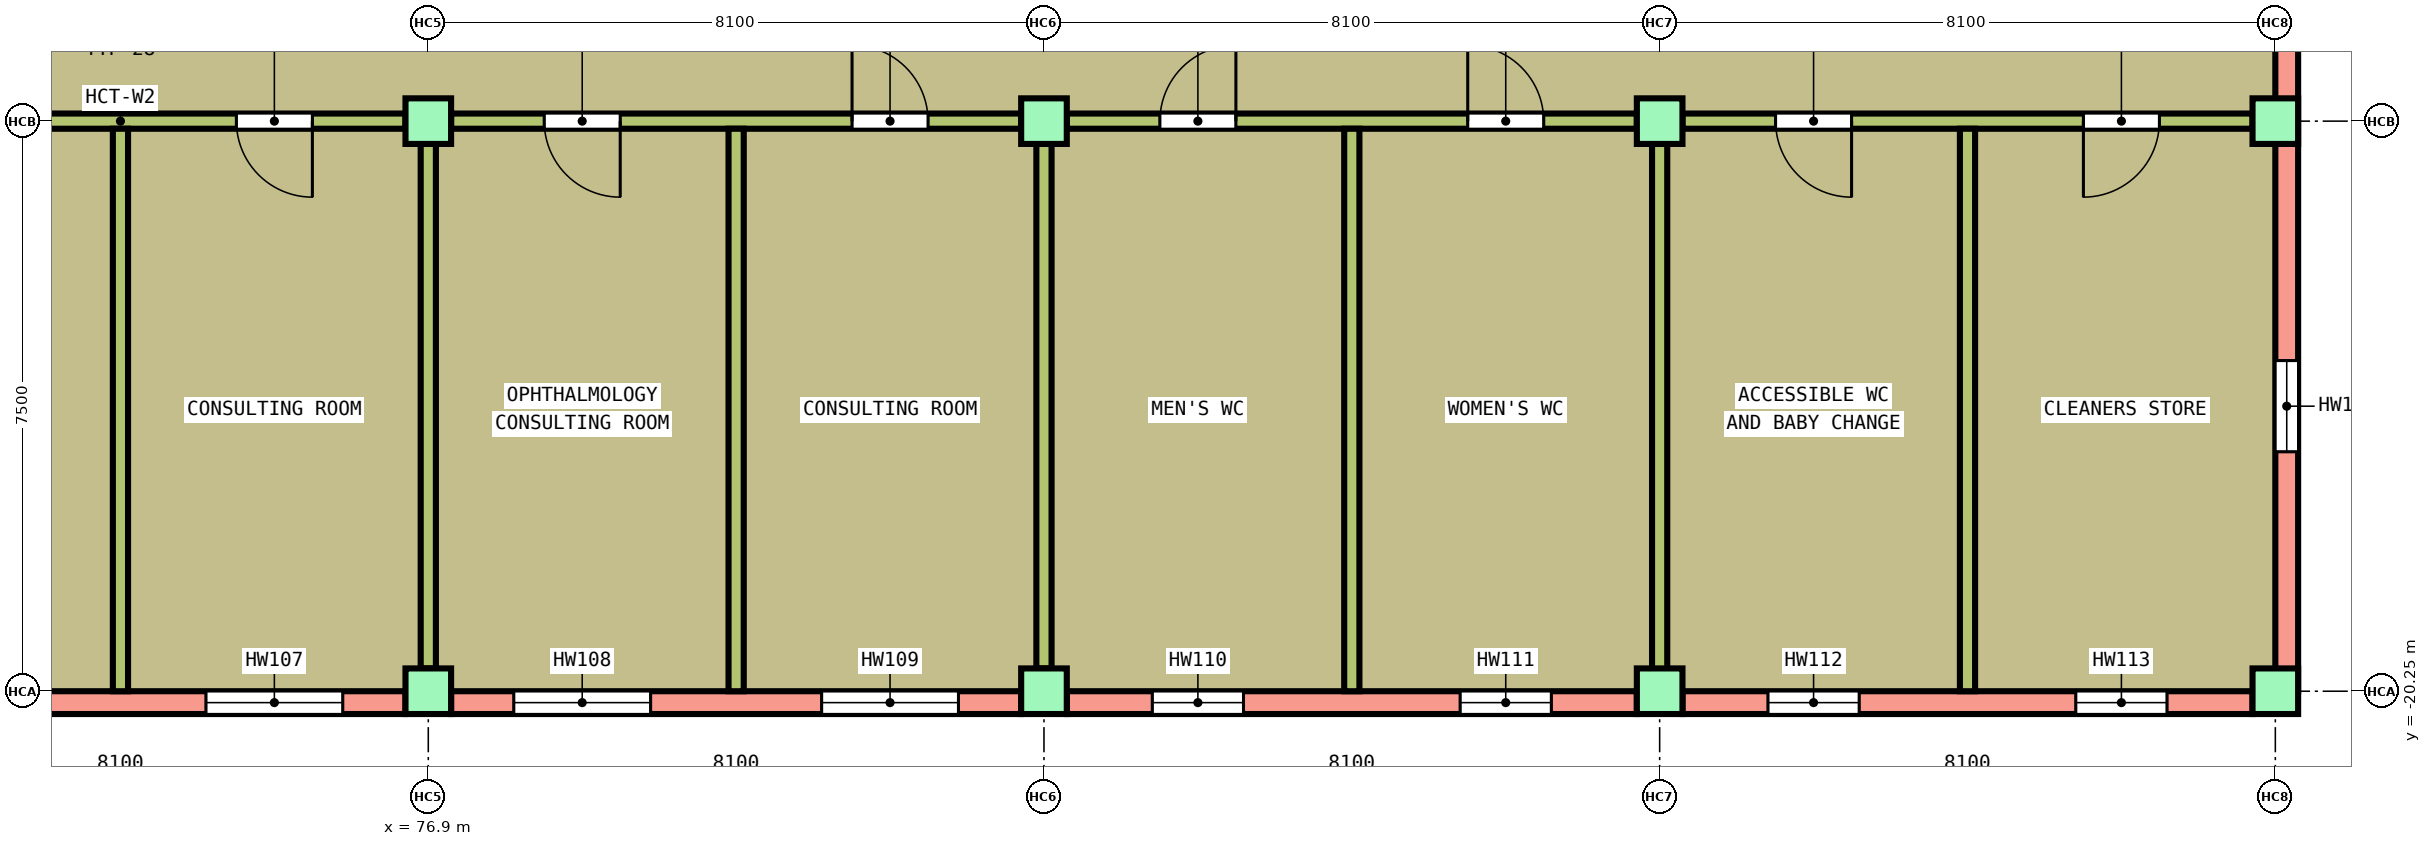
"""IFC4 building model, lengths in metres.
Left out: names, types, materials, properties, quantities, classifications, styles, units other than length and angle.
Written with IfcOpenShell. Run it as: python <this file> out.ifc"""

import sys

from ifc_helpers import new_model, si_unit, direction, frame, frame_2d, origin, origin_2d, place, context, subcontext, project, spatial, rectangle, extrude, element, fill, save


model = new_model("IFC4")
c1 = context("Model", 3, precision=1e-05, world=origin(), true_north=direction((0.0, 1.0)))
c2 = subcontext(c1, "Body", "Model", "MODEL_VIEW")
j1 = project(units=[si_unit("LENGTHUNIT", "METRE"), si_unit("PLANEANGLEUNIT", "RADIAN")], contexts=[c1])
p1 = place(None, origin())
s1 = spatial("IfcSite", under=j1, at=p1, CompositionType="ELEMENT")
p2 = place(p1, origin())
s2 = spatial("IfcBuilding", under=s1, at=p2, CompositionType="ELEMENT")
p3 = place(p2, frame((0.0, 0.0, 5.6)))
s3 = spatial("IfcBuildingStorey", under=s2, at=p3, CompositionType="ELEMENT", Elevation=5.6)
for number, where, z_axis, x_axis in (
    (1, (76.9, -20.25, 0.0), (0.0, 0.0, 1.0), (1.0, 0.0, 0.0)),
    (2, (85.0, -20.25, 0.0), (0.0, 0.0, 1.0), (1.0, 0.0, 0.0)),
):
    element("IfcColumn", number, at=place(p3, frame(where, z_axis=z_axis, x_axis=x_axis)), inside=s3, PredefinedType="COLUMN", context=c2, shape_type="SweptSolid", body=[
        extrude(rectangle(XDim=0.6, YDim=0.6, at=origin_2d()), origin(), (0.0, 0.0, 1.0), 4.6),
    ])
for number, where, z_axis, x_axis in (
    (3, (93.1, -20.25, 0.0), (0.0, 0.0, 1.0), (1.0, 0.0, 0.0)),
    (4, (101.2, -20.25, 0.0), (0.0, 0.0, 1.0), (1.0, 0.0, 0.0)),
):
    element("IfcColumn", number, at=place(p3, frame(where, z_axis=z_axis, x_axis=x_axis)), inside=s3, PredefinedType="COLUMN", context=c2, shape_type="SweptSolid", body=[
        extrude(rectangle(XDim=0.6, YDim=0.6, at=origin_2d()), origin(), (0.0, 0.0, 1.0), 4.35),
    ])
for number, where, z_axis, x_axis in (
    (5, (76.9, -12.75, 0.0), (0.0, 0.0, 1.0), (1.0, 0.0, 0.0)),
    (6, (85.0, -12.75, 0.0), (0.0, 0.0, 1.0), (1.0, 0.0, 0.0)),
    (7, (93.1, -12.75, 0.0), (0.0, 0.0, 1.0), (1.0, 0.0, 0.0)),
    (8, (101.2, -12.75, 0.0), (0.0, 0.0, 1.0), (1.0, 0.0, 0.0)),
):
    element("IfcColumn", number, at=place(p3, frame(where, z_axis=z_axis, x_axis=x_axis)), inside=s3, PredefinedType="COLUMN", context=c2, shape_type="SweptSolid", body=[
        extrude(rectangle(XDim=0.6, YDim=0.6, at=origin_2d()), origin(), (0.0, 0.0, 1.0), 4.6),
    ])
p4 = place(p3, frame((69.1, -20.4, 0.0), z_axis=(0.0, 0.0, 1.0), x_axis=(1.0, 0.0, 0.0)))
e9 = element("IfcWall", 9, at=p4, inside=s3, PredefinedType="SOLIDWALL", context=c2, shape_type="SweptSolid", body=[
    extrude(rectangle(XDim=7.5, YDim=0.3, at=frame_2d((3.75, 0.0))), origin(), (0.0, 0.0, 1.0), 3.8),
])
p5 = place(p4, frame((0.825, 0.0, 0.9)))
e10 = element("IfcOpeningElement", 10, at=p5, cuts=e9, PredefinedType="OPENING", context=c2, shape_type="SweptSolid", body=[
    extrude(rectangle(XDim=1.8, YDim=1.8, at=frame_2d((0.9, 0.9))), frame((0.0, 0.16, 0.0), z_axis=(0.0, -1.0, 0.0), x_axis=(1.0, 0.0, 0.0)), (0.0, 0.0, 1.0), 0.32),
])
p6 = place(p4, frame((4.875, 0.0, 0.9)))
e11 = element("IfcOpeningElement", 11, at=p6, cuts=e9, PredefinedType="OPENING", context=c2, shape_type="SweptSolid", body=[
    extrude(rectangle(XDim=1.8, YDim=1.8, at=frame_2d((0.9, 0.9))), frame((0.0, 0.16, 0.0), z_axis=(0.0, -1.0, 0.0), x_axis=(1.0, 0.0, 0.0)), (0.0, 0.0, 1.0), 0.32),
])
p7 = place(p3, frame((77.2, -20.4, 0.0), z_axis=(0.0, 0.0, 1.0), x_axis=(1.0, 0.0, 0.0)))
e12 = element("IfcWall", 12, at=p7, inside=s3, PredefinedType="SOLIDWALL", context=c2, shape_type="SweptSolid", body=[
    extrude(rectangle(XDim=7.5, YDim=0.3, at=frame_2d((3.75, 0.0))), origin(), (0.0, 0.0, 1.0), 3.8),
])
p8 = place(p7, frame((0.825, 0.0, 0.9)))
e13 = element("IfcOpeningElement", 13, at=p8, cuts=e12, PredefinedType="OPENING", context=c2, shape_type="SweptSolid", body=[
    extrude(rectangle(XDim=1.8, YDim=1.8, at=frame_2d((0.9, 0.9))), frame((0.0, 0.16, 0.0), z_axis=(0.0, -1.0, 0.0), x_axis=(1.0, 0.0, 0.0)), (0.0, 0.0, 1.0), 0.32),
])
p9 = place(p7, frame((4.875, 0.0, 0.9)))
e14 = element("IfcOpeningElement", 14, at=p9, cuts=e12, PredefinedType="OPENING", context=c2, shape_type="SweptSolid", body=[
    extrude(rectangle(XDim=1.8, YDim=1.8, at=frame_2d((0.9, 0.9))), frame((0.0, 0.16, 0.0), z_axis=(0.0, -1.0, 0.0), x_axis=(1.0, 0.0, 0.0)), (0.0, 0.0, 1.0), 0.32),
])
p10 = place(p3, frame((85.3, -20.4, 0.0), z_axis=(0.0, 0.0, 1.0), x_axis=(1.0, 0.0, 0.0)))
e15 = element("IfcWall", 15, at=p10, inside=s3, PredefinedType="SOLIDWALL", context=c2, shape_type="SweptSolid", body=[
    extrude(rectangle(XDim=7.5, YDim=0.3, at=frame_2d((3.75, 0.0))), origin(), (0.0, 0.0, 1.0), 3.8),
])
p11 = place(p10, frame((1.125, 0.0, 1.5)))
e16 = element("IfcOpeningElement", 16, at=p11, cuts=e15, PredefinedType="OPENING", context=c2, shape_type="SweptSolid", body=[
    extrude(rectangle(XDim=1.2, YDim=0.9, at=frame_2d((0.6, 0.45))), frame((0.0, 0.16, 0.0), z_axis=(0.0, -1.0, 0.0), x_axis=(1.0, 0.0, 0.0)), (0.0, 0.0, 1.0), 0.32),
])
p12 = place(p10, frame((5.175, 0.0, 1.5)))
e17 = element("IfcOpeningElement", 17, at=p12, cuts=e15, PredefinedType="OPENING", context=c2, shape_type="SweptSolid", body=[
    extrude(rectangle(XDim=1.2, YDim=0.9, at=frame_2d((0.6, 0.45))), frame((0.0, 0.16, 0.0), z_axis=(0.0, -1.0, 0.0), x_axis=(1.0, 0.0, 0.0)), (0.0, 0.0, 1.0), 0.32),
])
p13 = place(p3, frame((93.4, -20.4, 0.0), z_axis=(0.0, 0.0, 1.0), x_axis=(1.0, 0.0, 0.0)))
e18 = element("IfcWall", 18, at=p13, inside=s3, PredefinedType="SOLIDWALL", context=c2, shape_type="SweptSolid", body=[
    extrude(rectangle(XDim=7.5, YDim=0.3, at=frame_2d((3.75, 0.0))), origin(), (0.0, 0.0, 1.0), 3.8),
])
p14 = place(p13, frame((1.125, 0.0, 1.5)))
e19 = element("IfcOpeningElement", 19, at=p14, cuts=e18, PredefinedType="OPENING", context=c2, shape_type="SweptSolid", body=[
    extrude(rectangle(XDim=1.2, YDim=0.9, at=frame_2d((0.6, 0.45))), frame((0.0, 0.16, 0.0), z_axis=(0.0, -1.0, 0.0), x_axis=(1.0, 0.0, 0.0)), (0.0, 0.0, 1.0), 0.32),
])
p15 = place(p13, frame((5.175, 0.0, 1.5)))
e20 = element("IfcOpeningElement", 20, at=p15, cuts=e18, PredefinedType="OPENING", context=c2, shape_type="SweptSolid", body=[
    extrude(rectangle(XDim=1.2, YDim=0.9, at=frame_2d((0.6, 0.45))), frame((0.0, 0.16, 0.0), z_axis=(0.0, -1.0, 0.0), x_axis=(1.0, 0.0, 0.0)), (0.0, 0.0, 1.0), 0.32),
])
p16 = place(p3, frame((69.1, -12.75, 0.0), z_axis=(0.0, 0.0, 1.0), x_axis=(1.0, 0.0, 0.0)))
e21 = element("IfcWall", 21, at=p16, inside=s3, PredefinedType="PARTITIONING", context=c2, shape_type="SweptSolid", body=[
    extrude(rectangle(XDim=7.5, YDim=0.2, at=frame_2d((3.75, 0.0))), origin(), (0.0, 0.0, 1.0), 3.8),
])
p17 = place(p16, frame((5.275, 0.0, 0.0)))
e22 = element("IfcOpeningElement", 22, at=p17, cuts=e21, PredefinedType="OPENING", context=c2, shape_type="SweptSolid", body=[
    extrude(rectangle(XDim=1.0, YDim=2.1, at=frame_2d((0.5, 1.05))), frame((0.0, 0.11, 0.0), z_axis=(0.0, -1.0, 0.0), x_axis=(1.0, 0.0, 0.0)), (0.0, 0.0, 1.0), 0.22),
])
p18 = place(p3, frame((77.2, -12.75, 0.0), z_axis=(0.0, 0.0, 1.0), x_axis=(1.0, 0.0, 0.0)))
e23 = element("IfcWall", 23, at=p18, inside=s3, PredefinedType="PARTITIONING", context=c2, shape_type="SweptSolid", body=[
    extrude(rectangle(XDim=7.5, YDim=0.2, at=frame_2d((3.75, 0.0))), origin(), (0.0, 0.0, 1.0), 3.8),
])
p19 = place(p18, frame((1.225, 0.0, 0.0)))
e24 = element("IfcOpeningElement", 24, at=p19, cuts=e23, PredefinedType="OPENING", context=c2, shape_type="SweptSolid", body=[
    extrude(rectangle(XDim=1.0, YDim=2.1, at=frame_2d((0.5, 1.05))), frame((0.0, 0.11, 0.0), z_axis=(0.0, -1.0, 0.0), x_axis=(1.0, 0.0, 0.0)), (0.0, 0.0, 1.0), 0.22),
])
p20 = place(p18, frame((5.275, 0.0, 0.0)))
e25 = element("IfcOpeningElement", 25, at=p20, cuts=e23, PredefinedType="OPENING", context=c2, shape_type="SweptSolid", body=[
    extrude(rectangle(XDim=1.0, YDim=2.1, at=frame_2d((0.5, 1.05))), frame((0.0, 0.11, 0.0), z_axis=(0.0, -1.0, 0.0), x_axis=(1.0, 0.0, 0.0)), (0.0, 0.0, 1.0), 0.22),
])
p21 = place(p3, frame((85.3, -12.75, 0.0), z_axis=(0.0, 0.0, 1.0), x_axis=(1.0, 0.0, 0.0)))
e26 = element("IfcWall", 26, at=p21, inside=s3, PredefinedType="PARTITIONING", context=c2, shape_type="SweptSolid", body=[
    extrude(rectangle(XDim=7.5, YDim=0.2, at=frame_2d((3.75, 0.0))), origin(), (0.0, 0.0, 1.0), 3.8),
])
p22 = place(p21, frame((1.225, 0.0, 0.0)))
e27 = element("IfcOpeningElement", 27, at=p22, cuts=e26, PredefinedType="OPENING", context=c2, shape_type="SweptSolid", body=[
    extrude(rectangle(XDim=1.0, YDim=2.1, at=frame_2d((0.5, 1.05))), frame((0.0, 0.11, 0.0), z_axis=(0.0, -1.0, 0.0), x_axis=(1.0, 0.0, 0.0)), (0.0, 0.0, 1.0), 0.22),
])
p23 = place(p21, frame((5.275, 0.0, 0.0)))
e28 = element("IfcOpeningElement", 28, at=p23, cuts=e26, PredefinedType="OPENING", context=c2, shape_type="SweptSolid", body=[
    extrude(rectangle(XDim=1.0, YDim=2.1, at=frame_2d((0.5, 1.05))), frame((0.0, 0.11, 0.0), z_axis=(0.0, -1.0, 0.0), x_axis=(1.0, 0.0, 0.0)), (0.0, 0.0, 1.0), 0.22),
])
p24 = place(p3, frame((93.4, -12.75, 0.0), z_axis=(0.0, 0.0, 1.0), x_axis=(1.0, 0.0, 0.0)))
e29 = element("IfcWall", 29, at=p24, inside=s3, PredefinedType="PARTITIONING", context=c2, shape_type="SweptSolid", body=[
    extrude(rectangle(XDim=7.5, YDim=0.2, at=frame_2d((3.75, 0.0))), origin(), (0.0, 0.0, 1.0), 3.8),
])
p25 = place(p24, frame((1.225, 0.0, 0.0)))
e30 = element("IfcOpeningElement", 30, at=p25, cuts=e29, PredefinedType="OPENING", context=c2, shape_type="SweptSolid", body=[
    extrude(rectangle(XDim=1.0, YDim=2.1, at=frame_2d((0.5, 1.05))), frame((0.0, 0.11, 0.0), z_axis=(0.0, -1.0, 0.0), x_axis=(1.0, 0.0, 0.0)), (0.0, 0.0, 1.0), 0.22),
])
p26 = place(p24, frame((5.275, 0.0, 0.0)))
e31 = element("IfcOpeningElement", 31, at=p26, cuts=e29, PredefinedType="OPENING", context=c2, shape_type="SweptSolid", body=[
    extrude(rectangle(XDim=1.0, YDim=2.1, at=frame_2d((0.5, 1.05))), frame((0.0, 0.11, 0.0), z_axis=(0.0, -1.0, 0.0), x_axis=(1.0, 0.0, 0.0)), (0.0, 0.0, 1.0), 0.22),
])
p27 = place(p3, frame((72.85, -20.25, 0.0), z_axis=(0.0, 0.0, 1.0), x_axis=(0.0, 1.0, 0.0)))
e32 = element("IfcWall", 32, at=p27, inside=s3, PredefinedType="PARTITIONING", context=c2, shape_type="SweptSolid", body=[
    extrude(rectangle(XDim=7.4, YDim=0.2, at=frame_2d((3.7, 0.0))), origin(), (0.0, 0.0, 1.0), 3.8),
])
p28 = place(p3, frame((76.9, -19.95, 0.0), z_axis=(0.0, 0.0, 1.0), x_axis=(0.0, 1.0, 0.0)))
e33 = element("IfcWall", 33, at=p28, inside=s3, PredefinedType="PARTITIONING", context=c2, shape_type="SweptSolid", body=[
    extrude(rectangle(XDim=6.9, YDim=0.2, at=frame_2d((3.45, 0.0))), origin(), (0.0, 0.0, 1.0), 3.8),
])
p29 = place(p3, frame((80.95, -20.25, 0.0), z_axis=(0.0, 0.0, 1.0), x_axis=(0.0, 1.0, 0.0)))
e34 = element("IfcWall", 34, at=p29, inside=s3, PredefinedType="PARTITIONING", context=c2, shape_type="SweptSolid", body=[
    extrude(rectangle(XDim=7.4, YDim=0.2, at=frame_2d((3.7, 0.0))), origin(), (0.0, 0.0, 1.0), 3.8),
])
p30 = place(p3, frame((85.0, -19.95, 0.0), z_axis=(0.0, 0.0, 1.0), x_axis=(0.0, 1.0, 0.0)))
e35 = element("IfcWall", 35, at=p30, inside=s3, PredefinedType="PARTITIONING", context=c2, shape_type="SweptSolid", body=[
    extrude(rectangle(XDim=6.9, YDim=0.2, at=frame_2d((3.45, 0.0))), origin(), (0.0, 0.0, 1.0), 3.8),
])
p31 = place(p3, frame((89.05, -20.25, 0.0), z_axis=(0.0, 0.0, 1.0), x_axis=(0.0, 1.0, 0.0)))
e36 = element("IfcWall", 36, at=p31, inside=s3, PredefinedType="PARTITIONING", context=c2, shape_type="SweptSolid", body=[
    extrude(rectangle(XDim=7.4, YDim=0.2, at=frame_2d((3.7, 0.0))), origin(), (0.0, 0.0, 1.0), 3.8),
])
p32 = place(p3, frame((93.1, -20.25, 0.0), z_axis=(0.0, 0.0, 1.0), x_axis=(0.0, 1.0, 0.0)))
e37 = element("IfcWall", 37, at=p32, inside=s3, PredefinedType="PARTITIONING", context=c2, shape_type="SweptSolid", body=[
    extrude(rectangle(XDim=7.5, YDim=0.2, at=frame_2d((3.75, 0.0))), origin(), (0.0, 0.0, 1.0), 3.8),
])
p33 = place(p3, frame((97.15, -20.25, 0.0), z_axis=(0.0, 0.0, 1.0), x_axis=(0.0, 1.0, 0.0)))
e38 = element("IfcWall", 38, at=p33, inside=s3, PredefinedType="PARTITIONING", context=c2, shape_type="SweptSolid", body=[
    extrude(rectangle(XDim=7.4, YDim=0.2, at=frame_2d((3.7, 0.0))), origin(), (0.0, 0.0, 1.0), 3.8),
])
p34 = place(p3, frame((101.35, 20.25, 0.0), z_axis=(0.0, 0.0, 1.0), x_axis=(0.0, -1.0, 0.0)))
e39 = element("IfcWall", 39, at=p34, inside=s3, PredefinedType="SOLIDWALL", context=c2, shape_type="SweptSolid", body=[
    extrude(rectangle(XDim=40.5, YDim=0.3, at=frame_2d((20.25, 0.0))), origin(), (0.0, 0.0, 1.0), 3.8),
])
p35 = place(p34, frame((36.15, 0.0, 1.5)))
e40 = element("IfcOpeningElement", 40, at=p35, cuts=e39, PredefinedType="OPENING", context=c2, shape_type="SweptSolid", body=[
    extrude(rectangle(XDim=1.2, YDim=0.9, at=frame_2d((0.6, 0.45))), frame((0.0, 0.16, 0.0), z_axis=(0.0, -1.0, 0.0), x_axis=(1.0, 0.0, 0.0)), (0.0, 0.0, 1.0), 0.32),
])
p36 = place(p34, frame((24.225, 0.0, 0.9)))
e41 = element("IfcOpeningElement", 41, at=p36, cuts=e39, PredefinedType="OPENING", context=c2, shape_type="SweptSolid", body=[
    extrude(rectangle(XDim=1.8, YDim=1.8, at=frame_2d((0.9, 0.9))), frame((0.0, 0.16, 0.0), z_axis=(0.0, -1.0, 0.0), x_axis=(1.0, 0.0, 0.0)), (0.0, 0.0, 1.0), 0.32),
])
p37 = place(p34, frame((14.475, 0.0, 0.9)))
e42 = element("IfcOpeningElement", 42, at=p37, cuts=e39, PredefinedType="OPENING", context=c2, shape_type="SweptSolid", body=[
    extrude(rectangle(XDim=1.8, YDim=1.8, at=frame_2d((0.9, 0.9))), frame((0.0, 0.16, 0.0), z_axis=(0.0, -1.0, 0.0), x_axis=(1.0, 0.0, 0.0)), (0.0, 0.0, 1.0), 0.32),
])
p38 = place(p17, origin())
e43 = element("IfcDoor", 43, at=p38, inside=s3, OperationType="SINGLE_SWING_RIGHT", PredefinedType="DOOR", context=c2, shape_type="SweptSolid", body=[
    extrude(rectangle(XDim=1.0, YDim=2.1, at=frame_2d((0.5, 1.05))), frame((0.0, 0.025, 0.0), z_axis=(0.0, -1.0, 0.0), x_axis=(1.0, 0.0, 0.0)), (0.0, 0.0, 1.0), 0.05),
])
fill(e22, e43)
p39 = place(p19, origin())
e44 = element("IfcDoor", 44, at=p39, inside=s3, OperationType="SINGLE_SWING_LEFT", PredefinedType="DOOR", context=c2, shape_type="SweptSolid", body=[
    extrude(rectangle(XDim=1.0, YDim=2.1, at=frame_2d((0.5, 1.05))), frame((0.0, 0.025, 0.0), z_axis=(0.0, -1.0, 0.0), x_axis=(1.0, 0.0, 0.0)), (0.0, 0.0, 1.0), 0.05),
])
fill(e24, e44)
p40 = place(p20, origin())
e45 = element("IfcDoor", 45, at=p40, inside=s3, OperationType="SINGLE_SWING_RIGHT", PredefinedType="DOOR", context=c2, shape_type="SweptSolid", body=[
    extrude(rectangle(XDim=1.0, YDim=2.1, at=frame_2d((0.5, 1.05))), frame((0.0, 0.025, 0.0), z_axis=(0.0, -1.0, 0.0), x_axis=(1.0, 0.0, 0.0)), (0.0, 0.0, 1.0), 0.05),
])
fill(e25, e45)
p41 = place(p22, origin())
e46 = element("IfcDoor", 46, at=p41, inside=s3, OperationType="SINGLE_SWING_LEFT", PredefinedType="DOOR", context=c2, shape_type="SweptSolid", body=[
    extrude(rectangle(XDim=1.0, YDim=2.1, at=frame_2d((0.5, 1.05))), frame((0.0, 0.025, 0.0), z_axis=(0.0, -1.0, 0.0), x_axis=(1.0, 0.0, 0.0)), (0.0, 0.0, 1.0), 0.05),
])
fill(e27, e46)
p42 = place(p23, origin())
e47 = element("IfcDoor", 47, at=p42, inside=s3, OperationType="SINGLE_SWING_RIGHT", PredefinedType="DOOR", context=c2, shape_type="SweptSolid", body=[
    extrude(rectangle(XDim=1.0, YDim=2.1, at=frame_2d((0.5, 1.05))), frame((0.0, 0.025, 0.0), z_axis=(0.0, -1.0, 0.0), x_axis=(1.0, 0.0, 0.0)), (0.0, 0.0, 1.0), 0.05),
])
fill(e28, e47)
p43 = place(p25, origin())
e48 = element("IfcDoor", 48, at=p43, inside=s3, OperationType="SINGLE_SWING_LEFT", PredefinedType="DOOR", context=c2, shape_type="SweptSolid", body=[
    extrude(rectangle(XDim=1.0, YDim=2.1, at=frame_2d((0.5, 1.05))), frame((0.0, 0.025, 0.0), z_axis=(0.0, -1.0, 0.0), x_axis=(1.0, 0.0, 0.0)), (0.0, 0.0, 1.0), 0.05),
])
fill(e30, e48)
p44 = place(p26, origin())
e49 = element("IfcDoor", 49, at=p44, inside=s3, OperationType="SINGLE_SWING_RIGHT", PredefinedType="DOOR", context=c2, shape_type="SweptSolid", body=[
    extrude(rectangle(XDim=1.0, YDim=2.1, at=frame_2d((0.5, 1.05))), frame((0.0, 0.025, 0.0), z_axis=(0.0, -1.0, 0.0), x_axis=(1.0, 0.0, 0.0)), (0.0, 0.0, 1.0), 0.05),
])
fill(e31, e49)
p45 = place(p6, origin())
e50 = element("IfcWindow", 50, at=p45, inside=s3, PartitioningType="SINGLE_PANEL", PredefinedType="WINDOW", context=c2, shape_type="SweptSolid", body=[
    extrude(rectangle(XDim=1.8, YDim=1.8, at=frame_2d((0.9, 0.9))), frame((0.0, 0.03, 0.0), z_axis=(0.0, -1.0, 0.0), x_axis=(1.0, 0.0, 0.0)), (0.0, 0.0, 1.0), 0.06),
])
fill(e11, e50)
p46 = place(p8, origin())
e51 = element("IfcWindow", 51, at=p46, inside=s3, PartitioningType="SINGLE_PANEL", PredefinedType="WINDOW", context=c2, shape_type="SweptSolid", body=[
    extrude(rectangle(XDim=1.8, YDim=1.8, at=frame_2d((0.9, 0.9))), frame((0.0, 0.03, 0.0), z_axis=(0.0, -1.0, 0.0), x_axis=(1.0, 0.0, 0.0)), (0.0, 0.0, 1.0), 0.06),
])
fill(e13, e51)
p47 = place(p9, origin())
e52 = element("IfcWindow", 52, at=p47, inside=s3, PartitioningType="SINGLE_PANEL", PredefinedType="WINDOW", context=c2, shape_type="SweptSolid", body=[
    extrude(rectangle(XDim=1.8, YDim=1.8, at=frame_2d((0.9, 0.9))), frame((0.0, 0.03, 0.0), z_axis=(0.0, -1.0, 0.0), x_axis=(1.0, 0.0, 0.0)), (0.0, 0.0, 1.0), 0.06),
])
fill(e14, e52)
p48 = place(p11, origin())
e53 = element("IfcWindow", 53, at=p48, inside=s3, PartitioningType="SINGLE_PANEL", PredefinedType="WINDOW", context=c2, shape_type="SweptSolid", body=[
    extrude(rectangle(XDim=1.2, YDim=0.9, at=frame_2d((0.6, 0.45))), frame((0.0, 0.03, 0.0), z_axis=(0.0, -1.0, 0.0), x_axis=(1.0, 0.0, 0.0)), (0.0, 0.0, 1.0), 0.06),
])
fill(e16, e53)
p49 = place(p12, origin())
e54 = element("IfcWindow", 54, at=p49, inside=s3, PartitioningType="SINGLE_PANEL", PredefinedType="WINDOW", context=c2, shape_type="SweptSolid", body=[
    extrude(rectangle(XDim=1.2, YDim=0.9, at=frame_2d((0.6, 0.45))), frame((0.0, 0.03, 0.0), z_axis=(0.0, -1.0, 0.0), x_axis=(1.0, 0.0, 0.0)), (0.0, 0.0, 1.0), 0.06),
])
fill(e17, e54)
p50 = place(p14, origin())
e55 = element("IfcWindow", 55, at=p50, inside=s3, PartitioningType="SINGLE_PANEL", PredefinedType="WINDOW", context=c2, shape_type="SweptSolid", body=[
    extrude(rectangle(XDim=1.2, YDim=0.9, at=frame_2d((0.6, 0.45))), frame((0.0, 0.03, 0.0), z_axis=(0.0, -1.0, 0.0), x_axis=(1.0, 0.0, 0.0)), (0.0, 0.0, 1.0), 0.06),
])
fill(e19, e55)
p51 = place(p15, origin())
e56 = element("IfcWindow", 56, at=p51, inside=s3, PartitioningType="SINGLE_PANEL", PredefinedType="WINDOW", context=c2, shape_type="SweptSolid", body=[
    extrude(rectangle(XDim=1.2, YDim=0.9, at=frame_2d((0.6, 0.45))), frame((0.0, 0.03, 0.0), z_axis=(0.0, -1.0, 0.0), x_axis=(1.0, 0.0, 0.0)), (0.0, 0.0, 1.0), 0.06),
])
fill(e20, e56)
p52 = place(p35, origin())
e57 = element("IfcWindow", 57, at=p52, inside=s3, PartitioningType="SINGLE_PANEL", PredefinedType="WINDOW", context=c2, shape_type="SweptSolid", body=[
    extrude(rectangle(XDim=1.2, YDim=0.9, at=frame_2d((0.6, 0.45))), frame((0.0, 0.03, 0.0), z_axis=(0.0, -1.0, 0.0), x_axis=(1.0, 0.0, 0.0)), (0.0, 0.0, 1.0), 0.06),
])
fill(e40, e57)
save(model, sys.argv[1])
